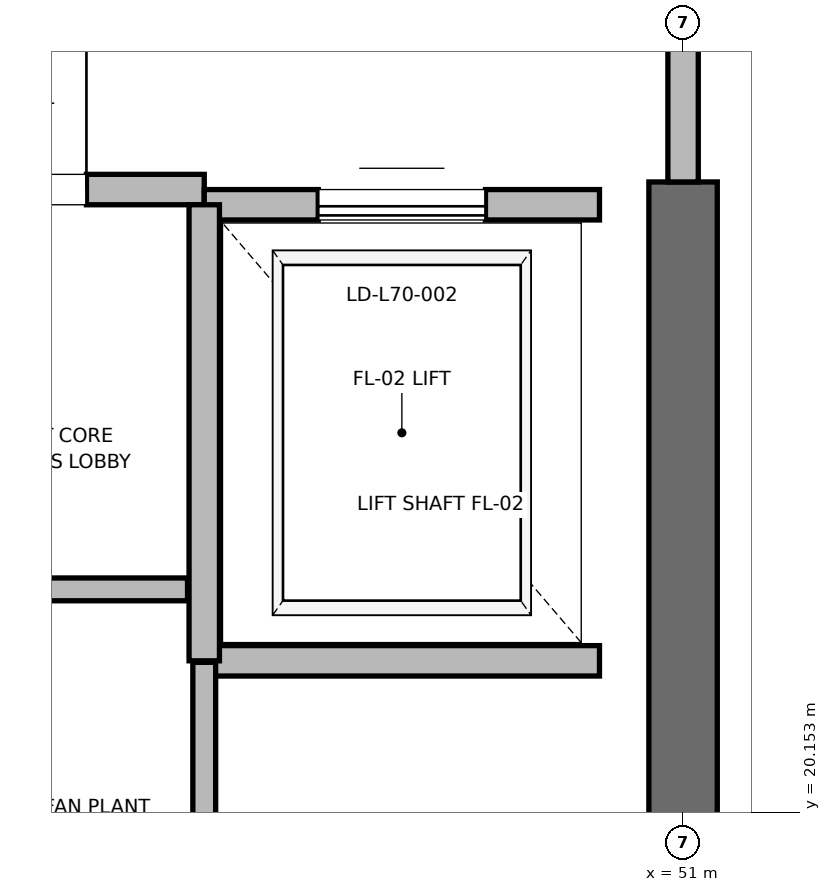
"""IFC4 building model, lengths in metres.
Left out: names, types, materials, properties, quantities, classifications, styles, units other than length and angle.
Written with IfcOpenShell. Run it as: python <this file> out.ifc"""

import sys

from ifc_helpers import new_model, si_unit, direction, frame, frame_2d, origin, place, context, subcontext, project, spatial, rectangle, extrude, element, fill, save


model = new_model("IFC4")
c1 = context("Model", 3, precision=1e-05, world=origin(), true_north=direction((0.0, 1.0)))
c2 = subcontext(c1, "Body", "Model", "MODEL_VIEW")
j1 = project(units=[si_unit("LENGTHUNIT", "METRE"), si_unit("PLANEANGLEUNIT", "RADIAN")], contexts=[c1])
p1 = place(None, origin())
s1 = spatial("IfcSite", under=j1, at=p1, CompositionType="ELEMENT")
p2 = place(p1, origin())
s2 = spatial("IfcBuilding", under=s1, at=p2, CompositionType="ELEMENT")
p3 = place(p2, frame((0.0, 0.0, 301.0)))
s3 = spatial("IfcBuildingStorey", under=s2, at=p3, CompositionType="ELEMENT", Elevation=301.0)
p4 = place(p3, frame((51.0, 18.5, 0.0), z_axis=(0.0, 0.0, 1.0), x_axis=(0.0, 1.0, 0.0)))
e1 = element("IfcWall", 1, at=p4, inside=s3, PredefinedType="SHEAR", context=c2, shape_type="SweptSolid", body=[
    extrude(rectangle(XDim=5.8, YDim=0.45, at=frame_2d((2.9, 0.0))), origin(), (0.0, 0.0, 1.0), 5.585),
])
p5 = place(p3, frame((45.15, 24.25, 0.0), z_axis=(0.0, 0.0, 1.0), x_axis=(1.0, 0.0, 0.0)))
e2 = element("IfcWall", 2, at=p5, inside=s3, PredefinedType="PARTITIONING", context=c2, shape_type="SweptSolid", body=[
    extrude(rectangle(XDim=2.7, YDim=0.2, at=frame_2d((1.35, 0.0))), origin(), (0.0, 0.0, 1.0), 5.585),
])
p6 = place(p5, frame((0.775, 0.0, 0.0)))
e3 = element("IfcOpeningElement", 3, at=p6, cuts=e2, PredefinedType="OPENING", context=c2, shape_type="SweptSolid", body=[
    extrude(rectangle(XDim=1.15, YDim=2.2, at=frame_2d((0.575, 1.1))), frame((0.0, 0.1, 0.0), z_axis=(0.0, -1.0, 0.0), x_axis=(1.0, 0.0, 0.0)), (0.0, 0.0, 1.0), 0.2),
])
p7 = place(p3, frame((51.0, 24.3, 0.0), z_axis=(0.0, 0.0, 1.0), x_axis=(0.0, 1.0, 0.0)))
e4 = element("IfcWall", 4, at=p7, inside=s3, PredefinedType="PARTITIONING", context=c2, shape_type="SweptSolid", body=[
    extrude(rectangle(XDim=3.4, YDim=0.2, at=frame_2d((1.7, 0.0))), origin(), (0.0, 0.0, 1.0), 4.665),
])
p8 = place(p7, frame((1.125, 0.0, 0.0)))
e5 = element("IfcOpeningElement", 5, at=p8, cuts=e4, PredefinedType="OPENING", context=c2, shape_type="SweptSolid", body=[
    extrude(rectangle(XDim=1.15, YDim=2.2, at=frame_2d((0.575, 1.1))), frame((0.0, 0.1, 0.0), z_axis=(0.0, -1.0, 0.0), x_axis=(1.0, 0.0, 0.0)), (0.0, 0.0, 1.0), 0.2),
])
p9 = place(p3, frame((47.85, 21.15, 0.0), z_axis=(0.0, 0.0, 1.0), x_axis=(1.0, 0.0, 0.0)))
e6 = element("IfcWall", 6, at=p9, inside=s3, PredefinedType="SOLIDWALL", context=c2, shape_type="SweptSolid", body=[
    extrude(rectangle(XDim=2.6, YDim=0.2, at=frame_2d((1.3, 0.0))), origin(), (0.0, 0.0, 1.0), 5.585),
])
p10 = place(p3, frame((50.45, 24.15, 0.0), z_axis=(0.0, 0.0, 1.0), x_axis=(-1.0, 0.0, 0.0)))
e7 = element("IfcWall", 7, at=p10, inside=s3, PredefinedType="SOLIDWALL", context=c2, shape_type="SweptSolid", body=[
    extrude(rectangle(XDim=2.6, YDim=0.2, at=frame_2d((1.3, 0.0))), origin(), (0.0, 0.0, 1.0), 4.665),
])
p11 = place(p10, frame((0.75, 0.0, 0.0)))
e8 = element("IfcOpeningElement", 8, at=p11, cuts=e7, PredefinedType="OPENING", context=c2, shape_type="SweptSolid", body=[
    extrude(rectangle(XDim=1.1, YDim=2.2, at=frame_2d((0.55, 1.1))), frame((0.0, 0.1, 0.0), z_axis=(0.0, -1.0, 0.0), x_axis=(1.0, 0.0, 0.0)), (0.0, 0.0, 1.0), 0.2),
])
p12 = place(p3, frame((47.85, 24.15, 0.0), z_axis=(0.0, 0.0, 1.0), x_axis=(0.0, -1.0, 0.0)))
e9 = element("IfcWall", 9, at=p12, inside=s3, PredefinedType="SOLIDWALL", context=c2, shape_type="SweptSolid", body=[
    extrude(rectangle(XDim=3.0, YDim=0.2, at=frame_2d((1.5, 0.0))), origin(), (0.0, 0.0, 1.0), 5.585),
])
p13 = place(p3, frame((47.85, 18.6, 0.0), z_axis=(0.0, 0.0, 1.0), x_axis=(0.0, 1.0, 0.0)))
e10 = element("IfcWall", 10, at=p13, inside=s3, PredefinedType="PARTITIONING", context=c2, shape_type="SweptSolid", body=[
    extrude(rectangle(XDim=2.54, YDim=0.15, at=frame_2d((1.27, 0.0))), origin(), (0.0, 0.0, 1.0), 2.85),
])
p14 = place(p3, frame((41.76, 21.62, 0.0), z_axis=(0.0, 0.0, 1.0), x_axis=(1.0, 0.0, 0.0)))
e11 = element("IfcWall", 11, at=p14, inside=s3, PredefinedType="PARTITIONING", context=c2, shape_type="SweptSolid", body=[
    extrude(rectangle(XDim=5.98, YDim=0.15, at=frame_2d((2.99, 0.0))), origin(), (0.0, 0.0, 1.0), 2.85),
])
p15 = place(p14, frame((2.55, 0.0, 0.0)))
e12 = element("IfcOpeningElement", 12, at=p15, cuts=e11, PredefinedType="OPENING", context=c2, shape_type="SweptSolid", body=[
    extrude(rectangle(XDim=0.88, YDim=2.1, at=frame_2d((0.44, 1.05))), frame((0.0, 0.075, 0.0), z_axis=(0.0, -1.0, 0.0), x_axis=(1.0, 0.0, 0.0)), (0.0, 0.0, 1.0), 0.15),
])
p16 = place(p6, origin())
e13 = element("IfcDoor", 13, at=p16, inside=s3, OperationType="SINGLE_SWING_RIGHT", PredefinedType="DOOR", context=c2, shape_type="SweptSolid", body=[
    extrude(rectangle(XDim=1.15, YDim=2.2, at=frame_2d((0.575, 1.1))), frame((0.0, 0.025, 0.0), z_axis=(0.0, -1.0, 0.0), x_axis=(1.0, 0.0, 0.0)), (0.0, 0.0, 1.0), 0.05),
])
fill(e3, e13)
p17 = place(p11, origin())
e14 = element("IfcDoor", 14, at=p17, inside=s3, OperationType="SLIDING_TO_RIGHT", PredefinedType="DOOR", context=c2, shape_type="SweptSolid", body=[
    extrude(rectangle(XDim=1.1, YDim=2.2, at=frame_2d((0.55, 1.1))), frame((0.0, 0.025, 0.0), z_axis=(0.0, -1.0, 0.0), x_axis=(1.0, 0.0, 0.0)), (0.0, 0.0, 1.0), 0.05),
])
fill(e8, e14)
save(model, sys.argv[1])
